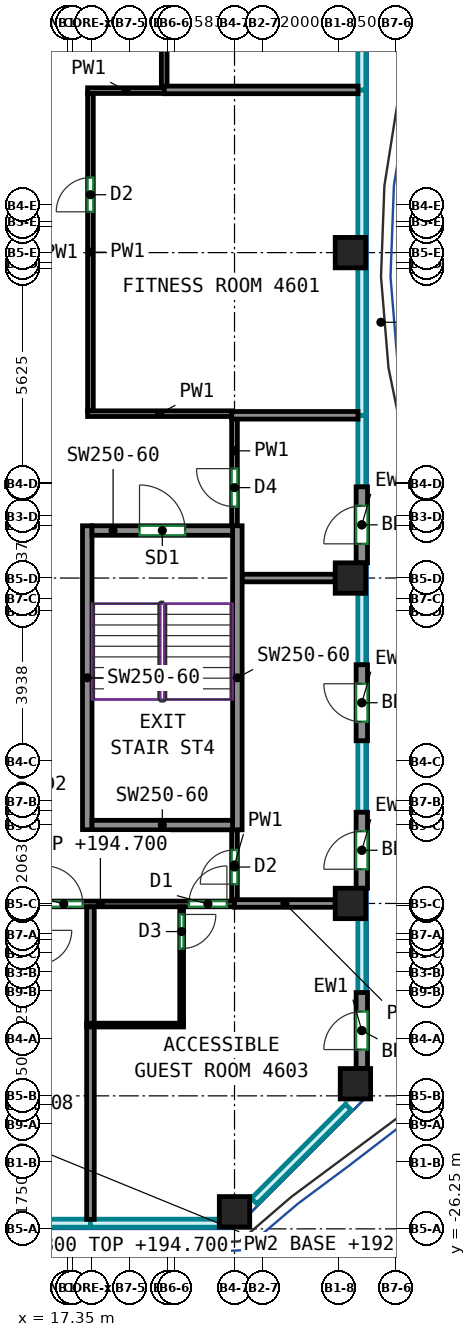
"""IFC4 building model, lengths in metres.
Left out: names, types, materials, properties, quantities, classifications, styles, units other than length and angle.
Written with IfcOpenShell. Run it as: python <this file> out.ifc"""

import sys

from ifc_helpers import new_model, si_unit, direction, frame, frame_2d, origin, origin_2d, place, context, subcontext, project, spatial, rectangle, extrude, source, transform, mapped, element, fill, save


model = new_model("IFC4")
c1 = context("Model", 3, precision=1e-05, world=origin(), true_north=direction((0.0, 1.0)))
c2 = subcontext(c1, "Body", "Model", "MODEL_VIEW")
j1 = project(units=[si_unit("LENGTHUNIT", "METRE"), si_unit("PLANEANGLEUNIT", "RADIAN")], contexts=[c1])
p1 = place(None, origin())
s1 = spatial("IfcSite", under=j1, at=p1, CompositionType="ELEMENT")
p2 = place(p1, origin())
s2 = spatial("IfcBuilding", under=s1, at=p2, CompositionType="ELEMENT")
p3 = place(p2, frame((0.0, 0.0, 192.3)))
s3 = spatial("IfcBuildingStorey", under=s2, at=p3, CompositionType="ELEMENT", Elevation=192.3)
m1 = source(origin(), c2, "Body", "SweptSolid", [
    extrude(rectangle(XDim=0.8, YDim=0.8, at=origin_2d()), origin(), (0.0, 0.0, 1.0), 3.0),
])
for number, where, z_axis, x_axis in (
    (1, (21.75, -25.8, 0.0), (0.0, 0.0, 1.0), (1.0, 0.0, 0.0)),
    (2, (24.8, -17.688, 0.0), (0.0, 0.0, 1.0), (1.0, 0.0, 0.0)),
    (3, (24.8, -9.125, 0.0), (0.0, 0.0, 1.0), (1.0, 0.0, 0.0)),
    (4, (24.8, -0.562, 0.0), (0.0, 0.0, 1.0), (1.0, 0.0, 0.0)),
    (5, (24.932, -22.432, 0.0), (0.0, 0.0, 1.0), (1.0, 0.0, 0.0)),
):
    element("IfcColumn", number, at=place(p3, frame(where, z_axis=z_axis, x_axis=x_axis)), inside=s3, PredefinedType="COLUMN", context=c2, shape_type="MappedRepresentation", body=[
        mapped(m1, transform((0.0, 0.0, 0.0))),
    ])
m2 = source(origin(), c2, "Body", "SweptSolid", [
    extrude(rectangle(XDim=8.0, YDim=0.25, at=frame_2d((4.0, 0.0))), origin(), (0.0, 0.0, 1.0), 3.0),
])
for number, where, z_axis, x_axis in (
    (6, (17.875, -15.75, 0.0), (0.0, 0.0, 1.0), (0.0, 1.0, 0.0)),
    (7, (21.825, -15.75, 0.0), (0.0, 0.0, 1.0), (0.0, 1.0, 0.0)),
):
    element("IfcWall", number, at=place(p3, frame(where, z_axis=z_axis, x_axis=x_axis)), inside=s3, PredefinedType="SHEAR", context=c2, shape_type="MappedRepresentation", body=[
        mapped(m2, transform((0.0, 0.0, 0.0))),
    ])
m3 = source(origin(), c2, "Body", "SweptSolid", [
    extrude(rectangle(XDim=3.7, YDim=0.25, at=frame_2d((1.85, 0.0))), origin(), (0.0, 0.0, 1.0), 3.0),
])
p4 = place(p3, frame((18.0, -15.625, 0.0), z_axis=(0.0, 0.0, 1.0), x_axis=(1.0, 0.0, 0.0)))
e8 = element("IfcWall", 8, at=p4, inside=s3, PredefinedType="SHEAR", context=c2, shape_type="MappedRepresentation", body=[
    mapped(m3, transform((0.0, 0.0, 0.0))),
])
p5 = place(p3, frame((18.0, -7.875, 0.0), z_axis=(0.0, 0.0, 1.0), x_axis=(1.0, 0.0, 0.0)))
e9 = element("IfcWall", 9, at=p5, inside=s3, PredefinedType="SHEAR", context=c2, shape_type="MappedRepresentation", body=[
    mapped(m3, transform((0.0, 0.0, 0.0))),
])
p6 = place(p5, frame((1.25, 0.0, 0.0)))
e10 = element("IfcOpeningElement", 10, at=p6, cuts=e9, PredefinedType="OPENING", context=c2, shape_type="SweptSolid", body=[
    extrude(rectangle(XDim=1.2, YDim=2.1, at=frame_2d((0.6, 1.05))), frame((0.0, 0.135, 0.0), z_axis=(0.0, -1.0, 0.0), x_axis=(1.0, 0.0, 0.0)), (0.0, 0.0, 1.0), 0.27),
])
m4 = source(origin(), c2, "Body", "SweptSolid", [
    extrude(rectangle(XDim=2.0, YDim=0.3, at=frame_2d((1.0, 0.0))), origin(), (0.0, 0.0, 1.0), 3.0),
])
p7 = place(p3, frame((25.1, -22.032, 0.0), z_axis=(0.0, 0.0, 1.0), x_axis=(0.0, 1.0, 0.0)))
e11 = element("IfcWall", 11, at=p7, inside=s3, PredefinedType="SOLIDWALL", context=c2, shape_type="MappedRepresentation", body=[
    mapped(m4, transform((0.0, 0.0, 0.0))),
])
p8 = place(p7, frame((0.5, 0.0, 0.0)))
e12 = element("IfcOpeningElement", 12, at=p8, cuts=e11, PredefinedType="OPENING", context=c2, shape_type="SweptSolid", body=[
    extrude(rectangle(XDim=1.0, YDim=2.1, at=frame_2d((0.5, 1.05))), frame((0.0, 0.16, 0.0), z_axis=(0.0, -1.0, 0.0), x_axis=(1.0, 0.0, 0.0)), (0.0, 0.0, 1.0), 0.32),
])
p9 = place(p3, frame((25.1, -17.288, 0.0), z_axis=(0.0, 0.0, 1.0), x_axis=(0.0, 1.0, 0.0)))
e13 = element("IfcWall", 13, at=p9, inside=s3, PredefinedType="SOLIDWALL", context=c2, shape_type="MappedRepresentation", body=[
    mapped(m4, transform((0.0, 0.0, 0.0))),
])
p10 = place(p9, frame((0.5, 0.0, 0.0)))
e14 = element("IfcOpeningElement", 14, at=p10, cuts=e13, PredefinedType="OPENING", context=c2, shape_type="SweptSolid", body=[
    extrude(rectangle(XDim=1.0, YDim=2.1, at=frame_2d((0.5, 1.05))), frame((0.0, 0.16, 0.0), z_axis=(0.0, -1.0, 0.0), x_axis=(1.0, 0.0, 0.0)), (0.0, 0.0, 1.0), 0.32),
])
p11 = place(p3, frame((25.1, -13.406, 0.0), z_axis=(0.0, 0.0, 1.0), x_axis=(0.0, 1.0, 0.0)))
e15 = element("IfcWall", 15, at=p11, inside=s3, PredefinedType="SOLIDWALL", context=c2, shape_type="MappedRepresentation", body=[
    mapped(m4, transform((0.0, 0.0, 0.0))),
])
p12 = place(p11, frame((0.5, 0.0, 0.0)))
e16 = element("IfcOpeningElement", 16, at=p12, cuts=e15, PredefinedType="OPENING", context=c2, shape_type="SweptSolid", body=[
    extrude(rectangle(XDim=1.0, YDim=2.1, at=frame_2d((0.5, 1.05))), frame((0.0, 0.16, 0.0), z_axis=(0.0, -1.0, 0.0), x_axis=(1.0, 0.0, 0.0)), (0.0, 0.0, 1.0), 0.32),
])
p13 = place(p3, frame((25.1, -8.725, 0.0), z_axis=(0.0, 0.0, 1.0), x_axis=(0.0, 1.0, 0.0)))
e17 = element("IfcWall", 17, at=p13, inside=s3, PredefinedType="SOLIDWALL", context=c2, shape_type="MappedRepresentation", body=[
    mapped(m4, transform((0.0, 0.0, 0.0))),
])
p14 = place(p13, frame((0.5, 0.0, 0.0)))
e18 = element("IfcOpeningElement", 18, at=p14, cuts=e17, PredefinedType="OPENING", context=c2, shape_type="SweptSolid", body=[
    extrude(rectangle(XDim=1.0, YDim=2.1, at=frame_2d((0.5, 1.05))), frame((0.0, 0.16, 0.0), z_axis=(0.0, -1.0, 0.0), x_axis=(1.0, 0.0, 0.0)), (0.0, 0.0, 1.0), 0.32),
])
p15 = place(p3, frame((14.692, -17.7, 0.0), z_axis=(0.0, 0.0, 1.0), x_axis=(1.0, 0.0, 0.0)))
e19 = element("IfcWall", 19, at=p15, inside=s3, PredefinedType="PARTITIONING", context=c2, shape_type="SweptSolid", body=[
    extrude(rectangle(XDim=7.058, YDim=0.15, at=frame_2d((3.529, 0.0))), origin(), (0.0, 0.0, 1.0), 2.4),
])
p16 = place(p15, frame((2.065, 0.0, 0.0)))
e20 = element("IfcOpeningElement", 20, at=p16, cuts=e19, PredefinedType="OPENING", context=c2, shape_type="SweptSolid", body=[
    extrude(rectangle(XDim=1.0, YDim=2.1, at=frame_2d((0.5, 1.05))), frame((0.0, 0.085, 0.0), z_axis=(0.0, -1.0, 0.0), x_axis=(1.0, 0.0, 0.0)), (0.0, 0.0, 1.0), 0.17),
])
p17 = place(p15, frame((5.858, 0.0, 0.0)))
e21 = element("IfcOpeningElement", 21, at=p17, cuts=e19, PredefinedType="OPENING", context=c2, shape_type="SweptSolid", body=[
    extrude(rectangle(XDim=1.0, YDim=2.1, at=frame_2d((0.5, 1.05))), frame((0.0, 0.085, 0.0), z_axis=(0.0, -1.0, 0.0), x_axis=(1.0, 0.0, 0.0)), (0.0, 0.0, 1.0), 0.17),
])
p18 = place(p3, frame((19.9, 3.809, 0.0), z_axis=(0.0, 0.0, 1.0), x_axis=(0.0, 1.0, 0.0)))
e22 = element("IfcWall", 22, at=p18, inside=s3, PredefinedType="PARTITIONING", context=c2, shape_type="SweptSolid", body=[
    extrude(rectangle(XDim=4.101, YDim=0.15, at=frame_2d((2.05, 0.0))), origin(), (0.0, 0.0, 1.0), 3.0),
])
p19 = place(p18, frame((1.1, 0.0, 0.0)))
e23 = element("IfcOpeningElement", 23, at=p19, cuts=e22, PredefinedType="OPENING", context=c2, shape_type="SweptSolid", body=[
    extrude(rectangle(XDim=0.9, YDim=2.1, at=frame_2d((0.45, 1.05))), frame((0.0, 0.085, 0.0), z_axis=(0.0, -1.0, 0.0), x_axis=(1.0, 0.0, 0.0)), (0.0, 0.0, 1.0), 0.17),
])
p20 = place(p3, frame((17.884, 3.7, 0.0), z_axis=(0.0, 0.0, 1.0), x_axis=(1.0, 0.0, 0.0)))
e24 = element("IfcWall", 24, at=p20, inside=s3, PredefinedType="PARTITIONING", context=c2, shape_type="SweptSolid", body=[
    extrude(rectangle(XDim=2.016, YDim=0.15, at=frame_2d((1.008, 0.0))), origin(), (0.0, 0.0, 1.0), 3.0),
])
p21 = place(p3, frame((17.959, -4.725, 0.0), z_axis=(0.0, 0.0, 1.0), x_axis=(0.0, 1.0, 0.0)))
e25 = element("IfcWall", 25, at=p21, inside=s3, PredefinedType="PARTITIONING", context=c2, shape_type="SweptSolid", body=[
    extrude(rectangle(XDim=8.35, YDim=0.15, at=frame_2d((4.175, 0.0))), origin(), (0.0, 0.0, 1.0), 3.0),
])
p22 = place(p21, frame((5.236, 0.0, 0.0)))
e26 = element("IfcOpeningElement", 26, at=p22, cuts=e25, PredefinedType="OPENING", context=c2, shape_type="SweptSolid", body=[
    extrude(rectangle(XDim=0.9, YDim=2.1, at=frame_2d((0.45, 1.05))), frame((0.0, 0.085, 0.0), z_axis=(0.0, -1.0, 0.0), x_axis=(1.0, 0.0, 0.0)), (0.0, 0.0, 1.0), 0.17),
])
p23 = place(p3, frame((17.884, -4.8, 0.0), z_axis=(0.0, 0.0, 1.0), x_axis=(1.0, 0.0, 0.0)))
e27 = element("IfcWall", 27, at=p23, inside=s3, PredefinedType="PARTITIONING", context=c2, shape_type="SweptSolid", body=[
    extrude(rectangle(XDim=3.793, YDim=0.15, at=frame_2d((1.896, 0.0))), origin(), (0.0, 0.0, 1.0), 3.0),
])
p24 = place(p3, frame((21.75, -7.75, 0.0), z_axis=(0.0, 0.0, 1.0), x_axis=(0.0, 1.0, 0.0)))
e28 = element("IfcWall", 28, at=p24, inside=s3, PredefinedType="PARTITIONING", context=c2, shape_type="SweptSolid", body=[
    extrude(rectangle(XDim=2.817, YDim=0.15, at=frame_2d((1.408, 0.0))), origin(), (0.0, 0.0, 1.0), 3.0),
])
p25 = place(p24, frame((0.504, 0.0, 0.0)))
e29 = element("IfcOpeningElement", 29, at=p25, cuts=e28, PredefinedType="OPENING", context=c2, shape_type="SweptSolid", body=[
    extrude(rectangle(XDim=1.0, YDim=2.1, at=frame_2d((0.5, 1.05))), frame((0.0, 0.085, 0.0), z_axis=(0.0, -1.0, 0.0), x_axis=(1.0, 0.0, 0.0)), (0.0, 0.0, 1.0), 0.17),
])
p26 = place(p3, frame((21.75, -17.598, 0.0), z_axis=(0.0, 0.0, 1.0), x_axis=(0.0, 1.0, 0.0)))
e30 = element("IfcWall", 30, at=p26, inside=s3, PredefinedType="PARTITIONING", context=c2, shape_type="SweptSolid", body=[
    extrude(rectangle(XDim=1.848, YDim=0.15, at=frame_2d((0.924, 0.0))), origin(), (0.0, 0.0, 1.0), 3.0),
])
p27 = place(p26, frame((0.419, 0.0, 0.0)))
e31 = element("IfcOpeningElement", 31, at=p27, cuts=e30, PredefinedType="OPENING", context=c2, shape_type="SweptSolid", body=[
    extrude(rectangle(XDim=0.9, YDim=2.1, at=frame_2d((0.45, 1.05))), frame((0.0, 0.085, 0.0), z_axis=(0.0, -1.0, 0.0), x_axis=(1.0, 0.0, 0.0)), (0.0, 0.0, 1.0), 0.17),
])
p28 = place(p3, frame((17.959, -26.0, 0.0), z_axis=(0.0, 0.0, 1.0), x_axis=(0.0, 1.0, 0.0)))
e32 = element("IfcWall", 32, at=p28, inside=s3, PredefinedType="PARTITIONING", context=c2, shape_type="SweptSolid", body=[
    extrude(rectangle(XDim=5.072, YDim=0.2, at=frame_2d((2.536, 0.0))), origin(), (0.0, 0.0, 1.0), 3.0),
])
p29 = place(p3, frame((17.959, -20.848, 0.0), z_axis=(0.0, 0.0, 1.0), x_axis=(0.0, 1.0, 0.0)))
e33 = element("IfcWall", 33, at=p29, inside=s3, PredefinedType="PARTITIONING", context=c2, shape_type="SweptSolid", body=[
    extrude(rectangle(XDim=3.071, YDim=0.2, at=frame_2d((1.535, 0.0))), origin(), (0.0, 0.0, 1.0), 3.0),
])
p30 = place(p3, frame((17.859, -20.888, 0.0), z_axis=(0.0, 0.0, 1.0), x_axis=(1.0, 0.0, 0.0)))
e34 = element("IfcWall", 34, at=p30, inside=s3, PredefinedType="PARTITIONING", context=c2, shape_type="SweptSolid", body=[
    extrude(rectangle(XDim=2.55, YDim=0.1, at=frame_2d((1.275, 0.0))), origin(), (0.0, 0.0, 1.0), 3.0),
])
p31 = place(p3, frame((20.359, -17.777, 0.0), z_axis=(0.0, 0.0, 1.0), x_axis=(0.0, -1.0, 0.0)))
e35 = element("IfcWall", 35, at=p31, inside=s3, PredefinedType="PARTITIONING", context=c2, shape_type="SweptSolid", body=[
    extrude(rectangle(XDim=3.061, YDim=0.1, at=frame_2d((1.53, 0.0))), origin(), (0.0, 0.0, 1.0), 3.0),
])
p32 = place(p31, frame((0.2, 0.0, 0.0)))
e36 = element("IfcOpeningElement", 36, at=p32, cuts=e35, PredefinedType="OPENING", context=c2, shape_type="SweptSolid", body=[
    extrude(rectangle(XDim=0.9, YDim=2.1, at=frame_2d((0.45, 1.05))), frame((0.0, 0.06, 0.0), z_axis=(0.0, -1.0, 0.0), x_axis=(1.0, 0.0, 0.0)), (0.0, 0.0, 1.0), 0.12),
])
p33 = place(p3, frame((21.752, -17.688, 0.0), z_axis=(0.0, 0.0, 1.0), x_axis=(1.0, 0.0, 0.0)))
e37 = element("IfcWall", 37, at=p33, inside=s3, PredefinedType="PARTITIONING", context=c2, shape_type="SweptSolid", body=[
    extrude(rectangle(XDim=2.648, YDim=0.2, at=frame_2d((1.324, 0.0))), origin(), (0.0, 0.0, 1.0), 2.4),
])
p34 = place(p3, frame((19.902, 3.719, 0.0), z_axis=(0.0, 0.0, 1.0), x_axis=(1.0, 0.0, 0.0)))
e38 = element("IfcWall", 38, at=p34, inside=s3, PredefinedType="PARTITIONING", context=c2, shape_type="SweptSolid", body=[
    extrude(rectangle(XDim=5.098, YDim=0.2, at=frame_2d((2.549, 0.0))), origin(), (0.0, 0.0, 1.0), 3.0),
])
p35 = place(p3, frame((21.677, -4.843, 0.0), z_axis=(0.0, 0.0, 1.0), x_axis=(1.0, 0.0, 0.0)))
e39 = element("IfcWall", 39, at=p35, inside=s3, PredefinedType="PARTITIONING", context=c2, shape_type="SweptSolid", body=[
    extrude(rectangle(XDim=3.323, YDim=0.2, at=frame_2d((1.662, 0.0))), origin(), (0.0, 0.0, 1.0), 3.0),
])
p36 = place(p3, frame((21.95, -9.125, 0.0), z_axis=(0.0, 0.0, 1.0), x_axis=(1.0, 0.0, 0.0)))
e40 = element("IfcWall", 40, at=p36, inside=s3, PredefinedType="PARTITIONING", context=c2, shape_type="SweptSolid", body=[
    extrude(rectangle(XDim=2.45, YDim=0.2, at=frame_2d((1.225, 0.0))), origin(), (0.0, 0.0, 1.0), 3.0),
])
p37 = place(p8, origin())
e41 = element("IfcDoor", 41, at=p37, inside=s3, OperationType="SINGLE_SWING_LEFT", PredefinedType="DOOR", context=c2, shape_type="SweptSolid", body=[
    extrude(rectangle(XDim=1.0, YDim=2.1, at=frame_2d((0.5, 1.05))), frame((0.0, 0.025, 0.0), z_axis=(0.0, -1.0, 0.0), x_axis=(1.0, 0.0, 0.0)), (0.0, 0.0, 1.0), 0.05),
])
fill(e12, e41)
p38 = place(p10, origin())
e42 = element("IfcDoor", 42, at=p38, inside=s3, OperationType="SINGLE_SWING_LEFT", PredefinedType="DOOR", context=c2, shape_type="SweptSolid", body=[
    extrude(rectangle(XDim=1.0, YDim=2.1, at=frame_2d((0.5, 1.05))), frame((0.0, 0.025, 0.0), z_axis=(0.0, -1.0, 0.0), x_axis=(1.0, 0.0, 0.0)), (0.0, 0.0, 1.0), 0.05),
])
fill(e14, e42)
p39 = place(p12, origin())
e43 = element("IfcDoor", 43, at=p39, inside=s3, OperationType="SINGLE_SWING_RIGHT", PredefinedType="DOOR", context=c2, shape_type="SweptSolid", body=[
    extrude(rectangle(XDim=1.0, YDim=2.1, at=frame_2d((0.5, 1.05))), frame((0.0, 0.025, 0.0), z_axis=(0.0, -1.0, 0.0), x_axis=(1.0, 0.0, 0.0)), (0.0, 0.0, 1.0), 0.05),
])
fill(e16, e43)
p40 = place(p14, origin())
e44 = element("IfcDoor", 44, at=p40, inside=s3, OperationType="SINGLE_SWING_LEFT", PredefinedType="DOOR", context=c2, shape_type="SweptSolid", body=[
    extrude(rectangle(XDim=1.0, YDim=2.1, at=frame_2d((0.5, 1.05))), frame((0.0, 0.025, 0.0), z_axis=(0.0, -1.0, 0.0), x_axis=(1.0, 0.0, 0.0)), (0.0, 0.0, 1.0), 0.05),
])
fill(e18, e44)
p41 = place(p6, origin())
e45 = element("IfcDoor", 45, at=p41, inside=s3, OperationType="DOUBLE_DOOR_SINGLE_SWING", PredefinedType="DOOR", context=c2, shape_type="SweptSolid", body=[
    extrude(rectangle(XDim=1.2, YDim=2.1, at=frame_2d((0.6, 1.05))), frame((0.0, 0.025, 0.0), z_axis=(0.0, -1.0, 0.0), x_axis=(1.0, 0.0, 0.0)), (0.0, 0.0, 1.0), 0.05),
])
fill(e10, e45)
p42 = place(p32, origin())
e46 = element("IfcDoor", 46, at=p42, inside=s3, OperationType="SINGLE_SWING_LEFT", PredefinedType="DOOR", context=c2, shape_type="SweptSolid", body=[
    extrude(rectangle(XDim=0.9, YDim=2.1, at=frame_2d((0.45, 1.05))), frame((0.0, 0.025, 0.0), z_axis=(0.0, -1.0, 0.0), x_axis=(1.0, 0.0, 0.0)), (0.0, 0.0, 1.0), 0.05),
])
fill(e36, e46)
p43 = place(p16, origin())
e47 = element("IfcDoor", 47, at=p43, inside=s3, OperationType="SINGLE_SWING_LEFT", PredefinedType="DOOR", context=c2, shape_type="SweptSolid", body=[
    extrude(rectangle(XDim=1.0, YDim=2.1, at=frame_2d((0.5, 1.05))), frame((0.0, 0.025, 0.0), z_axis=(0.0, -1.0, 0.0), x_axis=(1.0, 0.0, 0.0)), (0.0, 0.0, 1.0), 0.05),
])
fill(e20, e47)
p44 = place(p17, origin())
e48 = element("IfcDoor", 48, at=p44, inside=s3, OperationType="SINGLE_SWING_RIGHT", PredefinedType="DOOR", context=c2, shape_type="SweptSolid", body=[
    extrude(rectangle(XDim=1.0, YDim=2.1, at=frame_2d((0.5, 1.05))), frame((0.0, 0.025, 0.0), z_axis=(0.0, -1.0, 0.0), x_axis=(1.0, 0.0, 0.0)), (0.0, 0.0, 1.0), 0.05),
])
fill(e21, e48)
p45 = place(p27, origin())
e49 = element("IfcDoor", 49, at=p45, inside=s3, OperationType="SINGLE_SWING_LEFT", PredefinedType="DOOR", context=c2, shape_type="SweptSolid", body=[
    extrude(rectangle(XDim=0.9, YDim=2.1, at=frame_2d((0.45, 1.05))), frame((0.0, 0.025, 0.0), z_axis=(0.0, -1.0, 0.0), x_axis=(1.0, 0.0, 0.0)), (0.0, 0.0, 1.0), 0.05),
])
fill(e31, e49)
p46 = place(p25, origin())
e50 = element("IfcDoor", 50, at=p46, inside=s3, OperationType="SINGLE_SWING_RIGHT", PredefinedType="DOOR", context=c2, shape_type="SweptSolid", body=[
    extrude(rectangle(XDim=1.0, YDim=2.1, at=frame_2d((0.5, 1.05))), frame((0.0, 0.025, 0.0), z_axis=(0.0, -1.0, 0.0), x_axis=(1.0, 0.0, 0.0)), (0.0, 0.0, 1.0), 0.05),
])
fill(e29, e50)
p47 = place(p22, origin())
e51 = element("IfcDoor", 51, at=p47, inside=s3, OperationType="SINGLE_SWING_LEFT", PredefinedType="DOOR", context=c2, shape_type="SweptSolid", body=[
    extrude(rectangle(XDim=0.9, YDim=2.1, at=frame_2d((0.45, 1.05))), frame((0.0, 0.025, 0.0), z_axis=(0.0, -1.0, 0.0), x_axis=(1.0, 0.0, 0.0)), (0.0, 0.0, 1.0), 0.05),
])
fill(e26, e51)
save(model, sys.argv[1])
